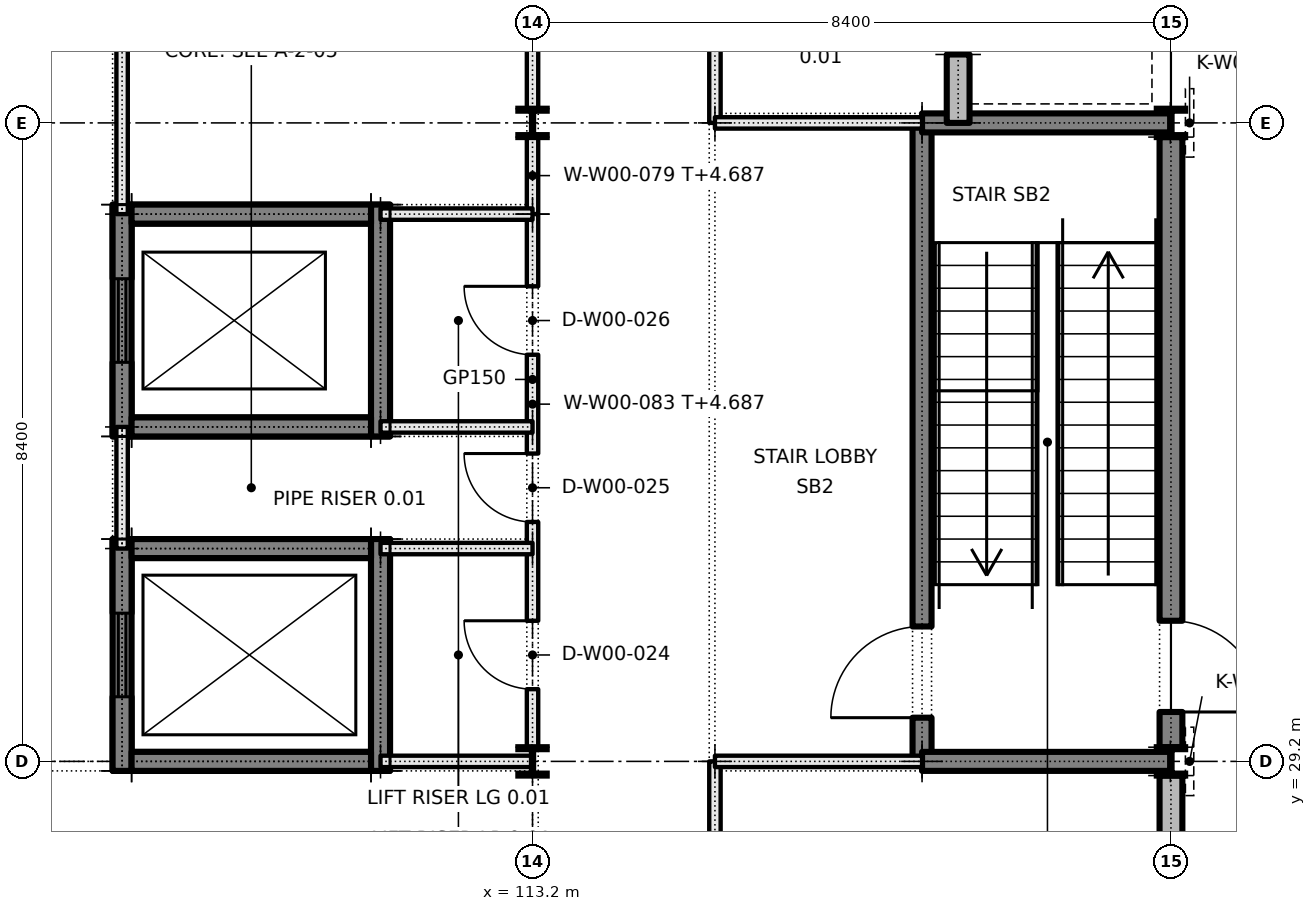
"""IFC4 building model, lengths in metres.
Left out: names, types, materials, properties, quantities, classifications, styles, units other than length and angle.
Written with IfcOpenShell. Run it as: python <this file> out.ifc"""

import sys

from ifc_helpers import new_model, si_unit, direction, frame, frame_2d, origin, origin_2d, place, context, subcontext, project, spatial, rectangle, i_section, extrude, element, fill, save


model = new_model("IFC4")
c1 = context("Model", 3, precision=1e-05, world=origin(), true_north=direction((0.0, 1.0)))
c2 = subcontext(c1, "Body", "Model", "MODEL_VIEW")
j1 = project(units=[si_unit("LENGTHUNIT", "METRE"), si_unit("PLANEANGLEUNIT", "RADIAN")], contexts=[c1])
p1 = place(None, origin())
s1 = spatial("IfcSite", under=j1, at=p1, CompositionType="ELEMENT")
p2 = place(p1, origin())
s2 = spatial("IfcBuilding", under=s1, at=p2, CompositionType="ELEMENT")
p3 = place(p2, origin())
s3 = spatial("IfcBuildingStorey", under=s2, at=p3, CompositionType="ELEMENT", Elevation=0.0)
p4 = place(p3, frame((107.8, 29.075, 0.0), z_axis=(0.0, 0.0, 1.0), x_axis=(0.0, 1.0, 0.0)))
e1 = element("IfcWall", 1, at=p4, inside=s3, PredefinedType="SOLIDWALL", context=c2, shape_type="SweptSolid", body=[
    extrude(rectangle(XDim=3.05, YDim=0.25, at=frame_2d((1.525, 0.0))), origin(), (0.0, 0.0, 1.0), 5.4),
])
p5 = place(p4, frame((0.975, 0.0, 0.0)))
e2 = element("IfcOpeningElement", 2, at=p5, cuts=e1, PredefinedType="OPENING", context=c2, shape_type="SweptSolid", body=[
    extrude(rectangle(XDim=1.1, YDim=2.1, at=frame_2d((0.55, 1.05))), frame((0.0, 0.135, 0.0), z_axis=(0.0, -1.0, 0.0), x_axis=(1.0, 0.0, 0.0)), (0.0, 0.0, 1.0), 0.27),
])
p6 = place(p3, frame((111.2, 29.075, 0.0), z_axis=(0.0, 0.0, 1.0), x_axis=(0.0, 1.0, 0.0)))
e3 = element("IfcWall", 3, at=p6, inside=s3, PredefinedType="SOLIDWALL", context=c2, shape_type="SweptSolid", body=[
    extrude(rectangle(XDim=3.05, YDim=0.25, at=frame_2d((1.525, 0.0))), origin(), (0.0, 0.0, 1.0), 5.4),
])
for number, where, z_axis, x_axis in (
    (4, (107.925, 29.2, 0.0), (0.0, 0.0, 1.0), (1.0, 0.0, 0.0)),
    (5, (107.925, 32.0, 0.0), (0.0, 0.0, 1.0), (1.0, 0.0, 0.0)),
):
    element("IfcWall", number, at=place(p3, frame(where, z_axis=z_axis, x_axis=x_axis)), inside=s3, PredefinedType="SOLIDWALL", context=c2, shape_type="SweptSolid", body=[
        extrude(rectangle(XDim=3.15, YDim=0.25, at=frame_2d((1.575, 0.0))), origin(), (0.0, 0.0, 1.0), 5.4),
    ])
for number, where, z_axis, x_axis in (
    (6, (107.8, 29.075, -1.2), (0.0, 0.0, 1.0), (0.0, 1.0, 0.0)),
    (7, (111.2, 29.075, -1.2), (0.0, 0.0, 1.0), (0.0, 1.0, 0.0)),
):
    element("IfcWall", number, at=place(p3, frame(where, z_axis=z_axis, x_axis=x_axis)), inside=s3, PredefinedType="SOLIDWALL", context=c2, shape_type="SweptSolid", body=[
        extrude(rectangle(XDim=3.05, YDim=0.25, at=frame_2d((1.525, 0.0))), origin(), (0.0, 0.0, 1.0), 1.2),
    ])
for number, where, z_axis, x_axis in (
    (8, (107.925, 29.2, -1.2), (0.0, 0.0, 1.0), (1.0, 0.0, 0.0)),
    (9, (107.925, 32.0, -1.2), (0.0, 0.0, 1.0), (1.0, 0.0, 0.0)),
):
    element("IfcWall", number, at=place(p3, frame(where, z_axis=z_axis, x_axis=x_axis)), inside=s3, PredefinedType="SOLIDWALL", context=c2, shape_type="SweptSolid", body=[
        extrude(rectangle(XDim=3.15, YDim=0.25, at=frame_2d((1.575, 0.0))), origin(), (0.0, 0.0, 1.0), 1.2),
    ])
p7 = place(p3, frame((107.8, 33.475, 0.0), z_axis=(0.0, 0.0, 1.0), x_axis=(0.0, 1.0, 0.0)))
e10 = element("IfcWall", 10, at=p7, inside=s3, PredefinedType="SOLIDWALL", context=c2, shape_type="SweptSolid", body=[
    extrude(rectangle(XDim=3.05, YDim=0.25, at=frame_2d((1.525, 0.0))), origin(), (0.0, 0.0, 1.0), 5.4),
])
p8 = place(p7, frame((0.975, 0.0, 0.0)))
e11 = element("IfcOpeningElement", 11, at=p8, cuts=e10, PredefinedType="OPENING", context=c2, shape_type="SweptSolid", body=[
    extrude(rectangle(XDim=1.1, YDim=2.1, at=frame_2d((0.55, 1.05))), frame((0.0, 0.135, 0.0), z_axis=(0.0, -1.0, 0.0), x_axis=(1.0, 0.0, 0.0)), (0.0, 0.0, 1.0), 0.27),
])
p9 = place(p3, frame((111.2, 33.475, 0.0), z_axis=(0.0, 0.0, 1.0), x_axis=(0.0, 1.0, 0.0)))
e12 = element("IfcWall", 12, at=p9, inside=s3, PredefinedType="SOLIDWALL", context=c2, shape_type="SweptSolid", body=[
    extrude(rectangle(XDim=3.05, YDim=0.25, at=frame_2d((1.525, 0.0))), origin(), (0.0, 0.0, 1.0), 5.4),
])
for number, where, z_axis, x_axis in (
    (13, (107.925, 33.6, 0.0), (0.0, 0.0, 1.0), (1.0, 0.0, 0.0)),
    (14, (107.925, 36.4, 0.0), (0.0, 0.0, 1.0), (1.0, 0.0, 0.0)),
):
    element("IfcWall", number, at=place(p3, frame(where, z_axis=z_axis, x_axis=x_axis)), inside=s3, PredefinedType="SOLIDWALL", context=c2, shape_type="SweptSolid", body=[
        extrude(rectangle(XDim=3.15, YDim=0.25, at=frame_2d((1.575, 0.0))), origin(), (0.0, 0.0, 1.0), 5.4),
    ])
for number, where, z_axis, x_axis in (
    (15, (107.8, 33.475, -1.2), (0.0, 0.0, 1.0), (0.0, 1.0, 0.0)),
    (16, (111.2, 33.475, -1.2), (0.0, 0.0, 1.0), (0.0, 1.0, 0.0)),
):
    element("IfcWall", number, at=place(p3, frame(where, z_axis=z_axis, x_axis=x_axis)), inside=s3, PredefinedType="SOLIDWALL", context=c2, shape_type="SweptSolid", body=[
        extrude(rectangle(XDim=3.05, YDim=0.25, at=frame_2d((1.525, 0.0))), origin(), (0.0, 0.0, 1.0), 1.2),
    ])
for number, where, z_axis, x_axis in (
    (17, (107.925, 33.6, -1.2), (0.0, 0.0, 1.0), (1.0, 0.0, 0.0)),
    (18, (107.925, 36.4, -1.2), (0.0, 0.0, 1.0), (1.0, 0.0, 0.0)),
):
    element("IfcWall", number, at=place(p3, frame(where, z_axis=z_axis, x_axis=x_axis)), inside=s3, PredefinedType="SOLIDWALL", context=c2, shape_type="SweptSolid", body=[
        extrude(rectangle(XDim=3.15, YDim=0.25, at=frame_2d((1.575, 0.0))), origin(), (0.0, 0.0, 1.0), 1.2),
    ])
for number, where, z_axis, x_axis in (
    (19, (113.2, 29.2, 0.0), (0.0, 0.0, 1.0), (1.0, 0.0, 0.0)),
    (20, (113.2, 37.6, 0.0), (0.0, 0.0, 1.0), (1.0, 0.0, 0.0)),
    (21, (121.6, 29.2, 0.0), (0.0, 0.0, 1.0), (1.0, 0.0, 0.0)),
    (22, (121.6, 37.6, 0.0), (0.0, 0.0, 1.0), (1.0, 0.0, 0.0)),
):
    element("IfcColumn", number, at=place(p3, frame(where, z_axis=z_axis, x_axis=x_axis)), inside=s3, PredefinedType="COLUMN", context=c2, shape_type="SweptSolid", body=[
        extrude(i_section(OverallWidth=0.373, OverallDepth=0.373, WebThickness=0.016, FlangeThickness=0.026, FilletRadius=0.015, at=origin_2d()), origin(), (0.0, 0.0, 1.0), 5.4),
    ])
p10 = place(p3, frame((118.325, 29.2, 0.0), z_axis=(0.0, 0.0, 1.0), x_axis=(0.0, 1.0, 0.0)))
e23 = element("IfcWall", 23, at=p10, inside=s3, PredefinedType="SHEAR", context=c2, shape_type="SweptSolid", body=[
    extrude(rectangle(XDim=8.4, YDim=0.25, at=frame_2d((4.2, 0.0))), origin(), (0.0, 0.0, 1.0), 5.4),
])
p11 = place(p10, frame((0.575, 0.0, 0.0)))
e24 = element("IfcOpeningElement", 24, at=p11, cuts=e23, PredefinedType="OPENING", context=c2, shape_type="SweptSolid", body=[
    extrude(rectangle(XDim=1.2, YDim=2.1, at=frame_2d((0.6, 1.05))), frame((0.0, 0.135, 0.0), z_axis=(0.0, -1.0, 0.0), x_axis=(1.0, 0.0, 0.0)), (0.0, 0.0, 1.0), 0.27),
])
p12 = place(p3, frame((121.6, 29.387, 0.0), z_axis=(0.0, 0.0, 1.0), x_axis=(0.0, 1.0, 0.0)))
e25 = element("IfcWall", 25, at=p12, inside=s3, PredefinedType="SHEAR", context=c2, shape_type="SweptSolid", body=[
    extrude(rectangle(XDim=8.027, YDim=0.3, at=frame_2d((4.013, 0.0))), origin(), (0.0, 0.0, 1.0), 5.4),
])
p13 = place(p12, frame((0.463, 0.0, 0.0)))
e26 = element("IfcOpeningElement", 26, at=p13, cuts=e25, PredefinedType="OPENING", context=c2, shape_type="SweptSolid", body=[
    extrude(rectangle(XDim=1.2, YDim=2.1, at=frame_2d((0.6, 1.05))), frame((0.0, 0.16, 0.0), z_axis=(0.0, -1.0, 0.0), x_axis=(1.0, 0.0, 0.0)), (0.0, 0.0, 1.0), 0.32),
])
for number, where, z_axis, x_axis in (
    (27, (118.325, 29.2, 0.0), (0.0, 0.0, 1.0), (1.0, 0.0, 0.0)),
    (28, (118.325, 37.6, 0.0), (0.0, 0.0, 1.0), (1.0, 0.0, 0.0)),
):
    element("IfcWall", number, at=place(p3, frame(where, z_axis=z_axis, x_axis=x_axis)), inside=s3, PredefinedType="SHEAR", context=c2, shape_type="SweptSolid", body=[
        extrude(rectangle(XDim=3.267, YDim=0.25, at=frame_2d((1.633, 0.0))), origin(), (0.0, 0.0, 1.0), 5.4),
    ])
for number, where, z_axis, x_axis in (
    (29, (121.6, 29.387, -0.25), (0.0, 0.0, 1.0), (0.0, 1.0, 0.0)),
    (30, (121.6, 36.78, -0.25), (0.0, 0.0, 1.0), (0.0, 1.0, 0.0)),
):
    element("IfcWall", number, at=place(p3, frame(where, z_axis=z_axis, x_axis=x_axis)), inside=s3, PredefinedType="SOLIDWALL", context=c2, shape_type="SweptSolid", body=[
        extrude(rectangle(XDim=0.633, YDim=0.3, at=frame_2d((0.317, 0.0))), origin(), (0.0, 0.0, 1.0), 0.25),
    ])
p14 = place(p3, frame((121.6, 30.02, -0.25), z_axis=(0.0, 0.0, 1.0), x_axis=(0.0, 1.0, 0.0)))
e31 = element("IfcWall", 31, at=p14, inside=s3, PredefinedType="SOLIDWALL", context=c2, shape_type="SweptSolid", body=[
    extrude(rectangle(XDim=6.76, YDim=0.3, at=frame_2d((3.38, 0.0))), origin(), (0.0, 0.0, 1.0), 0.25),
])
p15 = place(p3, frame((118.8, 37.6, 0.0), z_axis=(0.0, 0.0, 1.0), x_axis=(0.0, 1.0, 0.0)))
e32 = element("IfcWall", 32, at=p15, inside=s3, PredefinedType="SOLIDWALL", context=c2, shape_type="SweptSolid", body=[
    extrude(rectangle(XDim=0.9, YDim=0.3, at=frame_2d((0.45, 0.0))), origin(), (0.0, 0.0, 1.0), 4.814),
])
p16 = place(p3, frame((121.6, 20.987, 0.0), z_axis=(0.0, 0.0, 1.0), x_axis=(0.0, 1.0, 0.0)))
e33 = element("IfcWall", 33, at=p16, inside=s3, PredefinedType="SOLIDWALL", context=c2, shape_type="SweptSolid", body=[
    extrude(rectangle(XDim=8.027, YDim=0.3, at=frame_2d((4.013, 0.0))), origin(), (0.0, 0.0, 1.0), 4.687),
])
p17 = place(p3, frame((107.8, 36.4, 0.0), z_axis=(0.0, 0.0, 1.0), x_axis=(0.0, 1.0, 0.0)))
e34 = element("IfcWall", 34, at=p17, inside=s3, PredefinedType="PARTITIONING", context=c2, shape_type="SweptSolid", body=[
    extrude(rectangle(XDim=19.6, YDim=0.15, at=frame_2d((9.8, 0.0))), origin(), (0.0, 0.0, 1.0), 5.4),
])
p18 = place(p3, frame((107.8, 32.0, 0.0), z_axis=(0.0, 0.0, 1.0), x_axis=(0.0, 1.0, 0.0)))
e35 = element("IfcWall", 35, at=p18, inside=s3, PredefinedType="PARTITIONING", context=c2, shape_type="SweptSolid", body=[
    extrude(rectangle(XDim=1.6, YDim=0.15, at=frame_2d((0.8, 0.0))), origin(), (0.0, 0.0, 1.0), 5.4),
])
p19 = place(p3, frame((113.2, 36.4, 0.0), z_axis=(0.0, 0.0, 1.0), x_axis=(0.0, 1.0, 0.0)))
e36 = element("IfcWall", 36, at=p19, inside=s3, PredefinedType="PARTITIONING", context=c2, shape_type="SweptSolid", body=[
    extrude(rectangle(XDim=1.013, YDim=0.15, at=frame_2d((0.507, 0.0))), origin(), (0.0, 0.0, 1.0), 4.687),
])
p20 = place(p3, frame((113.2, 37.787, 0.0), z_axis=(0.0, 0.0, 1.0), x_axis=(0.0, 1.0, 0.0)))
e37 = element("IfcWall", 37, at=p20, inside=s3, PredefinedType="PARTITIONING", context=c2, shape_type="SweptSolid", body=[
    extrude(rectangle(XDim=8.027, YDim=0.15, at=frame_2d((4.013, 0.0))), origin(), (0.0, 0.0, 1.0), 4.687),
])
p21 = place(p20, frame((3.463, 0.0, 0.0)))
e38 = element("IfcOpeningElement", 38, at=p21, cuts=e37, PredefinedType="OPENING", context=c2, shape_type="SweptSolid", body=[
    extrude(rectangle(XDim=1.0, YDim=2.1, at=frame_2d((0.5, 1.05))), frame((0.0, 0.085, 0.0), z_axis=(0.0, -1.0, 0.0), x_axis=(1.0, 0.0, 0.0)), (0.0, 0.0, 1.0), 0.17),
])
p22 = place(p3, frame((113.2, 29.387, 0.0), z_axis=(0.0, 0.0, 1.0), x_axis=(0.0, 1.0, 0.0)))
e39 = element("IfcWall", 39, at=p22, inside=s3, PredefinedType="PARTITIONING", context=c2, shape_type="SweptSolid", body=[
    extrude(rectangle(XDim=7.013, YDim=0.15, at=frame_2d((3.507, 0.0))), origin(), (0.0, 0.0, 1.0), 4.687),
])
p23 = place(p22, frame((0.763, 0.0, 0.0)))
e40 = element("IfcOpeningElement", 40, at=p23, cuts=e39, PredefinedType="OPENING", context=c2, shape_type="SweptSolid", body=[
    extrude(rectangle(XDim=0.9, YDim=2.1, at=frame_2d((0.45, 1.05))), frame((0.0, 0.085, 0.0), z_axis=(0.0, -1.0, 0.0), x_axis=(1.0, 0.0, 0.0)), (0.0, 0.0, 1.0), 0.17),
])
p24 = place(p22, frame((2.963, 0.0, 0.0)))
e41 = element("IfcOpeningElement", 41, at=p24, cuts=e39, PredefinedType="OPENING", context=c2, shape_type="SweptSolid", body=[
    extrude(rectangle(XDim=0.9, YDim=2.1, at=frame_2d((0.45, 1.05))), frame((0.0, 0.085, 0.0), z_axis=(0.0, -1.0, 0.0), x_axis=(1.0, 0.0, 0.0)), (0.0, 0.0, 1.0), 0.17),
])
p25 = place(p22, frame((5.163, 0.0, 0.0)))
e42 = element("IfcOpeningElement", 42, at=p25, cuts=e39, PredefinedType="OPENING", context=c2, shape_type="SweptSolid", body=[
    extrude(rectangle(XDim=0.9, YDim=2.1, at=frame_2d((0.45, 1.05))), frame((0.0, 0.085, 0.0), z_axis=(0.0, -1.0, 0.0), x_axis=(1.0, 0.0, 0.0)), (0.0, 0.0, 1.0), 0.17),
])
p26 = place(p3, frame((115.6, 37.6, 0.0), z_axis=(0.0, 0.0, 1.0), x_axis=(0.0, 1.0, 0.0)))
e43 = element("IfcWall", 43, at=p26, inside=s3, PredefinedType="PARTITIONING", context=c2, shape_type="SweptSolid", body=[
    extrude(rectangle(XDim=21.0, YDim=0.15, at=frame_2d((10.5, 0.0))), origin(), (0.0, 0.0, 1.0), 5.4),
])
p27 = place(p26, frame((3.65, 0.0, 0.0)))
e44 = element("IfcOpeningElement", 44, at=p27, cuts=e43, PredefinedType="OPENING", context=c2, shape_type="SweptSolid", body=[
    extrude(rectangle(XDim=1.0, YDim=2.1, at=frame_2d((0.5, 1.05))), frame((0.0, 0.085, 0.0), z_axis=(0.0, -1.0, 0.0), x_axis=(1.0, 0.0, 0.0)), (0.0, 0.0, 1.0), 0.17),
])
p28 = place(p26, frame((14.15, 0.0, 0.0)))
e45 = element("IfcOpeningElement", 45, at=p28, cuts=e43, PredefinedType="OPENING", context=c2, shape_type="SweptSolid", body=[
    extrude(rectangle(XDim=1.0, YDim=2.1, at=frame_2d((0.5, 1.05))), frame((0.0, 0.085, 0.0), z_axis=(0.0, -1.0, 0.0), x_axis=(1.0, 0.0, 0.0)), (0.0, 0.0, 1.0), 0.17),
])
p29 = place(p3, frame((115.6, 21.4, 0.0), z_axis=(0.0, 0.0, 1.0), x_axis=(0.0, 1.0, 0.0)))
e46 = element("IfcWall", 46, at=p29, inside=s3, PredefinedType="PARTITIONING", context=c2, shape_type="SweptSolid", body=[
    extrude(rectangle(XDim=7.8, YDim=0.15, at=frame_2d((3.9, 0.0))), origin(), (0.0, 0.0, 1.0), 5.4),
])
p30 = place(p29, frame((2.95, 0.0, 0.0)))
e47 = element("IfcOpeningElement", 47, at=p30, cuts=e46, PredefinedType="OPENING", context=c2, shape_type="SweptSolid", body=[
    extrude(rectangle(XDim=1.8, YDim=2.1, at=frame_2d((0.9, 1.05))), frame((0.0, 0.085, 0.0), z_axis=(0.0, -1.0, 0.0), x_axis=(1.0, 0.0, 0.0)), (0.0, 0.0, 1.0), 0.17),
])
p31 = place(p3, frame((115.6, 29.2, 0.0), z_axis=(0.0, 0.0, 1.0), x_axis=(1.0, 0.0, 0.0)))
e48 = element("IfcWall", 48, at=p31, inside=s3, PredefinedType="PARTITIONING", context=c2, shape_type="SweptSolid", body=[
    extrude(rectangle(XDim=2.725, YDim=0.15, at=frame_2d((1.362, 0.0))), origin(), (0.0, 0.0, 1.0), 4.608),
])
p32 = place(p3, frame((111.2, 29.2, 0.0), z_axis=(0.0, 0.0, 1.0), x_axis=(1.0, 0.0, 0.0)))
e49 = element("IfcWall", 49, at=p32, inside=s3, PredefinedType="PARTITIONING", context=c2, shape_type="SweptSolid", body=[
    extrude(rectangle(XDim=1.992, YDim=0.15, at=frame_2d((0.996, 0.0))), origin(), (0.0, 0.0, 1.0), 4.608),
])
for number, where, z_axis, x_axis in (
    (50, (111.2, 32.0, 0.0), (0.0, 0.0, 1.0), (1.0, 0.0, 0.0)),
    (51, (111.2, 33.6, 0.0), (0.0, 0.0, 1.0), (1.0, 0.0, 0.0)),
    (52, (111.2, 36.4, 0.0), (0.0, 0.0, 1.0), (1.0, 0.0, 0.0)),
):
    element("IfcWall", number, at=place(p3, frame(where, z_axis=z_axis, x_axis=x_axis)), inside=s3, PredefinedType="PARTITIONING", context=c2, shape_type="SweptSolid", body=[
        extrude(rectangle(XDim=2.0, YDim=0.15, at=frame_2d((1.0, 0.0))), origin(), (0.0, 0.0, 1.0), 5.4),
    ])
p33 = place(p3, frame((115.6, 37.6, 0.0), z_axis=(0.0, 0.0, 1.0), x_axis=(1.0, 0.0, 0.0)))
e53 = element("IfcWall", 53, at=p33, inside=s3, PredefinedType="PARTITIONING", context=c2, shape_type="SweptSolid", body=[
    extrude(rectangle(XDim=2.725, YDim=0.15, at=frame_2d((1.362, 0.0))), origin(), (0.0, 0.0, 1.0), 4.608),
])
p34 = place(p5, origin())
e54 = element("IfcDoor", 54, at=p34, inside=s3, OperationType="SLIDING_TO_LEFT", PredefinedType="DOOR", context=c2, shape_type="SweptSolid", body=[
    extrude(rectangle(XDim=1.1, YDim=2.1, at=frame_2d((0.55, 1.05))), frame((0.0, 0.025, 0.0), z_axis=(0.0, -1.0, 0.0), x_axis=(1.0, 0.0, 0.0)), (0.0, 0.0, 1.0), 0.05),
])
fill(e2, e54)
p35 = place(p8, origin())
e55 = element("IfcDoor", 55, at=p35, inside=s3, OperationType="SLIDING_TO_LEFT", PredefinedType="DOOR", context=c2, shape_type="SweptSolid", body=[
    extrude(rectangle(XDim=1.1, YDim=2.1, at=frame_2d((0.55, 1.05))), frame((0.0, 0.025, 0.0), z_axis=(0.0, -1.0, 0.0), x_axis=(1.0, 0.0, 0.0)), (0.0, 0.0, 1.0), 0.05),
])
fill(e11, e55)
p36 = place(p13, frame((1.2, 0.0, 0.0), z_axis=(0.0, 0.0, 1.0), x_axis=(-1.0, 0.0, 0.0)))
e56 = element("IfcDoor", 56, at=p36, inside=s3, OperationType="SINGLE_SWING_RIGHT", PredefinedType="DOOR", context=c2, shape_type="SweptSolid", body=[
    extrude(rectangle(XDim=1.2, YDim=2.1, at=frame_2d((0.6, 1.05))), frame((0.0, 0.025, 0.0), z_axis=(0.0, -1.0, 0.0), x_axis=(1.0, 0.0, 0.0)), (0.0, 0.0, 1.0), 0.05),
])
fill(e26, e56)
p37 = place(p11, origin())
e57 = element("IfcDoor", 57, at=p37, inside=s3, OperationType="SINGLE_SWING_LEFT", PredefinedType="DOOR", context=c2, shape_type="SweptSolid", body=[
    extrude(rectangle(XDim=1.2, YDim=2.1, at=frame_2d((0.6, 1.05))), frame((0.0, 0.025, 0.0), z_axis=(0.0, -1.0, 0.0), x_axis=(1.0, 0.0, 0.0)), (0.0, 0.0, 1.0), 0.05),
])
fill(e24, e57)
p38 = place(p23, origin())
e58 = element("IfcDoor", 58, at=p38, inside=s3, OperationType="SINGLE_SWING_RIGHT", PredefinedType="DOOR", context=c2, shape_type="SweptSolid", body=[
    extrude(rectangle(XDim=0.9, YDim=2.1, at=frame_2d((0.45, 1.05))), frame((0.0, 0.025, 0.0), z_axis=(0.0, -1.0, 0.0), x_axis=(1.0, 0.0, 0.0)), (0.0, 0.0, 1.0), 0.05),
])
fill(e40, e58)
p39 = place(p24, origin())
e59 = element("IfcDoor", 59, at=p39, inside=s3, OperationType="SINGLE_SWING_RIGHT", PredefinedType="DOOR", context=c2, shape_type="SweptSolid", body=[
    extrude(rectangle(XDim=0.9, YDim=2.1, at=frame_2d((0.45, 1.05))), frame((0.0, 0.025, 0.0), z_axis=(0.0, -1.0, 0.0), x_axis=(1.0, 0.0, 0.0)), (0.0, 0.0, 1.0), 0.05),
])
fill(e41, e59)
p40 = place(p25, origin())
e60 = element("IfcDoor", 60, at=p40, inside=s3, OperationType="SINGLE_SWING_RIGHT", PredefinedType="DOOR", context=c2, shape_type="SweptSolid", body=[
    extrude(rectangle(XDim=0.9, YDim=2.1, at=frame_2d((0.45, 1.05))), frame((0.0, 0.025, 0.0), z_axis=(0.0, -1.0, 0.0), x_axis=(1.0, 0.0, 0.0)), (0.0, 0.0, 1.0), 0.05),
])
fill(e42, e60)
save(model, sys.argv[1])
